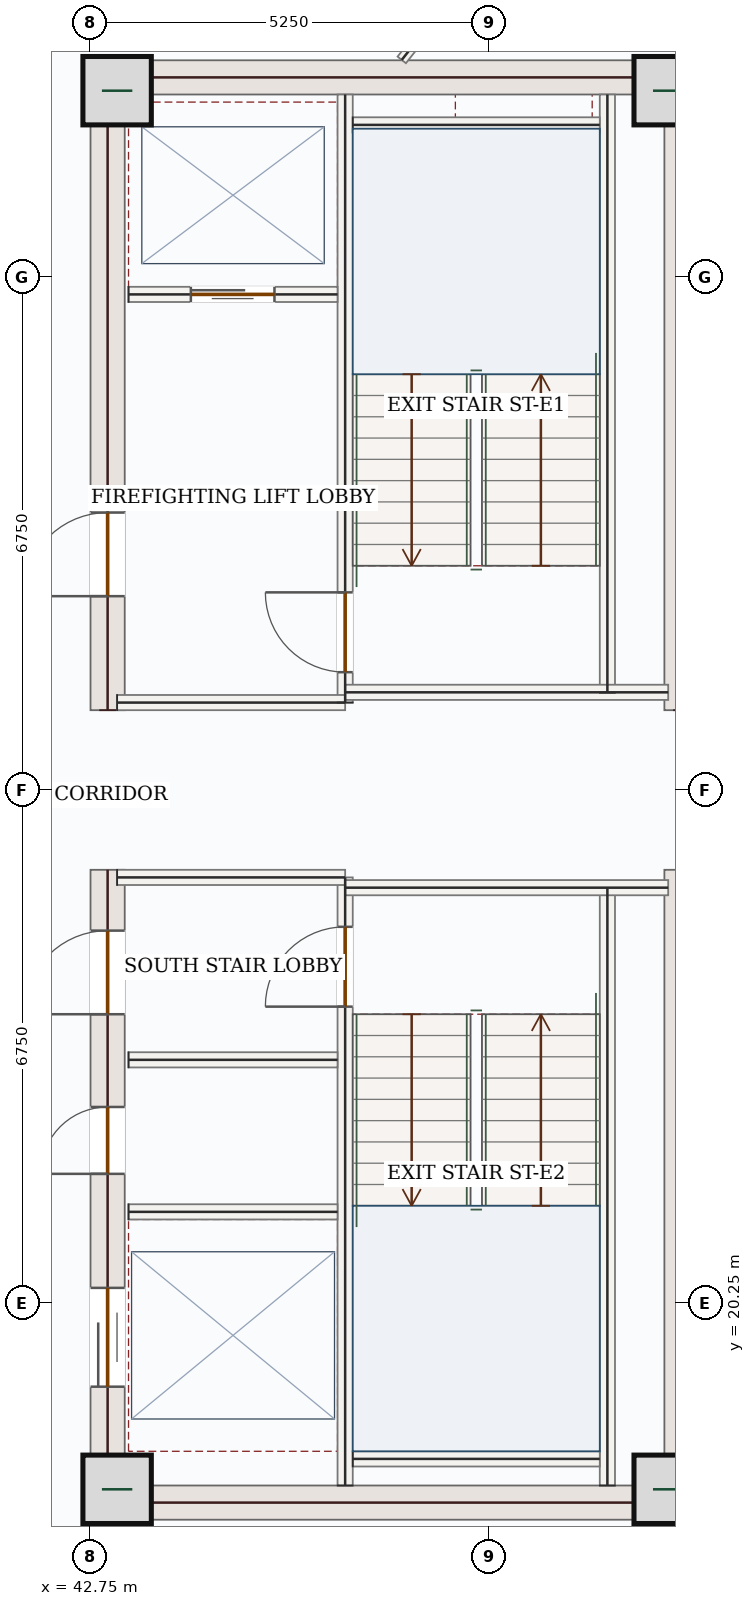
"""IFC4 building model, lengths in metres.
Left out: names, types, materials, properties, quantities, classifications, styles, units other than length and angle.
Written with IfcOpenShell. Run it as: python <this file> out.ifc"""

import sys

from ifc_helpers import new_model, si_unit, direction, frame, frame_2d, origin, origin_2d, place, context, subcontext, project, spatial, rectangle, extrude, source, transform, mapped, element, fill, save


model = new_model("IFC4")
c1 = context("Model", 3, precision=1e-05, world=origin(), true_north=direction((0.0, 1.0)))
c2 = subcontext(c1, "Body", "Model", "MODEL_VIEW")
j1 = project(units=[si_unit("LENGTHUNIT", "METRE"), si_unit("PLANEANGLEUNIT", "RADIAN")], contexts=[c1])
p1 = place(None, origin())
s1 = spatial("IfcSite", under=j1, at=p1, CompositionType="ELEMENT")
p2 = place(p1, origin())
s2 = spatial("IfcBuilding", under=s1, at=p2, CompositionType="ELEMENT")
p3 = place(p2, frame((0.0, 0.0, 319.8)))
s3 = spatial("IfcBuildingStorey", under=s2, at=p3, CompositionType="ELEMENT", Elevation=319.8)
p4 = place(p3, frame((42.975, 17.4, 0.0), z_axis=(0.0, 0.0, 1.0), x_axis=(0.0, 1.0, 0.0)))
e1 = element("IfcWall", 1, at=p4, inside=s3, PredefinedType="SHEAR", context=c2, shape_type="SweptSolid", body=[
    extrude(rectangle(XDim=8.55, YDim=0.45, at=frame_2d((4.275, 0.0))), origin(), (0.0, 0.0, 1.0), 3.5),
])
p5 = place(p4, frame((6.65, 0.0, 0.0)))
e2 = element("IfcOpeningElement", 2, at=p5, cuts=e1, PredefinedType="OPENING", context=c2, shape_type="SweptSolid", body=[
    extrude(rectangle(XDim=1.1, YDim=2.2, at=frame_2d((0.55, 1.1))), frame((0.0, 0.235, 0.0), z_axis=(0.0, -1.0, 0.0), x_axis=(1.0, 0.0, 0.0)), (0.0, 0.0, 1.0), 0.47),
])
p6 = place(p4, frame((1.75, 0.0, 0.0)))
e3 = element("IfcOpeningElement", 3, at=p6, cuts=e1, PredefinedType="OPENING", context=c2, shape_type="SweptSolid", body=[
    extrude(rectangle(XDim=1.3, YDim=2.2, at=frame_2d((0.65, 1.1))), frame((0.0, 0.235, 0.0), z_axis=(0.0, -1.0, 0.0), x_axis=(1.0, 0.0, 0.0)), (0.0, 0.0, 1.0), 0.47),
])
p7 = place(p4, frame((4.55, 0.0, 0.0)))
e4 = element("IfcOpeningElement", 4, at=p7, cuts=e1, PredefinedType="OPENING", context=c2, shape_type="SweptSolid", body=[
    extrude(rectangle(XDim=0.88, YDim=2.1, at=frame_2d((0.44, 1.05))), frame((0.0, 0.235, 0.0), z_axis=(0.0, -1.0, 0.0), x_axis=(1.0, 0.0, 0.0)), (0.0, 0.0, 1.0), 0.47),
])
p8 = place(p3, frame((42.975, 28.05, 0.0), z_axis=(0.0, 0.0, 1.0), x_axis=(0.0, 1.0, 0.0)))
e5 = element("IfcWall", 5, at=p8, inside=s3, PredefinedType="SHEAR", context=c2, shape_type="SweptSolid", body=[
    extrude(rectangle(XDim=8.55, YDim=0.45, at=frame_2d((4.275, 0.0))), origin(), (0.0, 0.0, 1.0), 3.5),
])
p9 = place(p8, frame((1.5, 0.0, 0.0)))
e6 = element("IfcOpeningElement", 6, at=p9, cuts=e5, PredefinedType="OPENING", context=c2, shape_type="SweptSolid", body=[
    extrude(rectangle(XDim=1.1, YDim=2.2, at=frame_2d((0.55, 1.1))), frame((0.0, 0.235, 0.0), z_axis=(0.0, -1.0, 0.0), x_axis=(1.0, 0.0, 0.0)), (0.0, 0.0, 1.0), 0.47),
])
m1 = source(origin(), c2, "Body", "SweptSolid", [
    extrude(rectangle(XDim=8.55, YDim=0.45, at=frame_2d((4.275, 0.0))), origin(), (0.0, 0.0, 1.0), 3.5),
])
for number, where, z_axis, x_axis in (
    (7, (50.525, 17.4, 0.0), (0.0, 0.0, 1.0), (0.0, 1.0, 0.0)),
    (8, (50.525, 28.05, 0.0), (0.0, 0.0, 1.0), (0.0, 1.0, 0.0)),
):
    element("IfcWall", number, at=place(p3, frame(where, z_axis=z_axis, x_axis=x_axis)), inside=s3, PredefinedType="SHEAR", context=c2, shape_type="MappedRepresentation", body=[
        mapped(m1, transform((0.0, 0.0, 0.0), x_axis=(1.0, 0.0, 0.0), y_axis=(0.0, 1.0, 0.0), z_axis=(0.0, 0.0, 1.0), scale=1.0)),
    ])
m2 = source(origin(), c2, "Body", "SweptSolid", [
    extrude(rectangle(XDim=7.1, YDim=0.45, at=frame_2d((3.55, 0.0))), origin(), (0.0, 0.0, 1.0), 3.5),
])
for number, where, z_axis, x_axis in (
    (9, (43.2, 17.625, 0.0), (0.0, 0.0, 1.0), (1.0, 0.0, 0.0)),
    (10, (43.2, 36.375, 0.0), (0.0, 0.0, 1.0), (1.0, 0.0, 0.0)),
):
    element("IfcWall", number, at=place(p3, frame(where, z_axis=z_axis, x_axis=x_axis)), inside=s3, PredefinedType="SHEAR", context=c2, shape_type="MappedRepresentation", body=[
        mapped(m2, transform((0.0, 0.0, 0.0), x_axis=(1.0, 0.0, 0.0), y_axis=(0.0, 1.0, 0.0), z_axis=(0.0, 0.0, 1.0), scale=1.0)),
    ])
m3 = source(origin(), c2, "Body", "SweptSolid", [
    extrude(rectangle(XDim=0.9, YDim=0.9, at=origin_2d()), origin(), (0.0, 0.0, 1.0), 3.75),
])
for number, where, z_axis, x_axis in (
    (11, (43.1, 17.8, 0.0), (0.0, 0.0, 1.0), (1.0, 0.0, 0.0)),
    (12, (50.35, 17.8, 0.0), (0.0, 0.0, 1.0), (1.0, 0.0, 0.0)),
    (13, (43.1, 36.2, 0.0), (0.0, 0.0, 1.0), (1.0, 0.0, 0.0)),
    (14, (50.35, 36.2, 0.0), (0.0, 0.0, 1.0), (1.0, 0.0, 0.0)),
):
    element("IfcColumn", number, at=place(p3, frame(where, z_axis=z_axis, x_axis=x_axis)), inside=s3, PredefinedType="COLUMN", context=c2, shape_type="MappedRepresentation", body=[
        mapped(m3, transform((0.0, 0.0, 0.0), x_axis=(1.0, 0.0, 0.0), y_axis=(0.0, 1.0, 0.0), z_axis=(0.0, 0.0, 1.0), scale=1.0)),
    ])
p10 = place(p3, frame((53.06, 18.458, 0.0), z_axis=(0.0, 0.0, 1.0), x_axis=(-0.707106781187, -0.707106781187, 0.0)))
e15 = element("IfcWall", 15, at=p10, inside=s3, PredefinedType="SOLIDWALL", context=c2, shape_type="SweptSolid", body=[
    extrude(rectangle(XDim=3.963, YDim=0.28, at=frame_2d((1.982, 0.0))), origin(), (0.0, 0.0, 1.0), 3.5),
])
p11 = place(p10, frame((1.232, 0.0, 0.85)))
e16 = element("IfcOpeningElement", 16, at=p11, cuts=e15, PredefinedType="OPENING", context=c2, shape_type="SweptSolid", body=[
    extrude(rectangle(XDim=1.5, YDim=1.5, at=frame_2d((0.75, 0.75))), frame((0.0, 0.15, 0.0), z_axis=(0.0, -1.0, 0.0), x_axis=(1.0, 0.0, 0.0)), (0.0, 0.0, 1.0), 0.3),
])
m4 = source(origin(), c2, "Body", "SweptSolid", [
    extrude(rectangle(XDim=7.87, YDim=0.2, at=frame_2d((3.935, 0.0))), origin(), (0.0, 0.0, 1.0), 3.5),
])
for number, where, z_axis, x_axis in (
    (17, (49.55, 17.85, 0.0), (0.0, 0.0, 1.0), (0.0, 1.0, 0.0)),
    (18, (49.55, 28.28, 0.0), (0.0, 0.0, 1.0), (0.0, 1.0, 0.0)),
):
    element("IfcWall", number, at=place(p3, frame(where, z_axis=z_axis, x_axis=x_axis)), inside=s3, PredefinedType="SOLIDWALL", context=c2, shape_type="MappedRepresentation", body=[
        mapped(m4, transform((0.0, 0.0, 0.0), x_axis=(1.0, 0.0, 0.0), y_axis=(0.0, 1.0, 0.0), z_axis=(0.0, 0.0, 1.0), scale=1.0)),
    ])
p12 = place(p3, frame((46.1, 17.85, 0.0), z_axis=(0.0, 0.0, 1.0), x_axis=(0.0, 1.0, 0.0)))
e19 = element("IfcWall", 19, at=p12, inside=s3, PredefinedType="SOLIDWALL", context=c2, shape_type="SweptSolid", body=[
    extrude(rectangle(XDim=8.0, YDim=0.2, at=frame_2d((4.0, 0.0))), origin(), (0.0, 0.0, 1.0), 3.5),
])
p13 = place(p12, frame((6.3, 0.0, 0.0)))
e20 = element("IfcOpeningElement", 20, at=p13, cuts=e19, PredefinedType="OPENING", context=c2, shape_type="SweptSolid", body=[
    extrude(rectangle(XDim=1.05, YDim=2.15, at=frame_2d((0.525, 1.075))), frame((0.0, 0.11, 0.0), z_axis=(0.0, -1.0, 0.0), x_axis=(1.0, 0.0, 0.0)), (0.0, 0.0, 1.0), 0.22),
])
p14 = place(p3, frame((46.1, 28.15, 0.0), z_axis=(0.0, 0.0, 1.0), x_axis=(0.0, 1.0, 0.0)))
e21 = element("IfcWall", 21, at=p14, inside=s3, PredefinedType="SOLIDWALL", context=c2, shape_type="SweptSolid", body=[
    extrude(rectangle(XDim=8.0, YDim=0.2, at=frame_2d((4.0, 0.0))), origin(), (0.0, 0.0, 1.0), 3.5),
])
p15 = place(p14, frame((0.4, 0.0, 0.0)))
e22 = element("IfcOpeningElement", 22, at=p15, cuts=e21, PredefinedType="OPENING", context=c2, shape_type="SweptSolid", body=[
    extrude(rectangle(XDim=1.05, YDim=2.15, at=frame_2d((0.525, 1.075))), frame((0.0, 0.11, 0.0), z_axis=(0.0, -1.0, 0.0), x_axis=(1.0, 0.0, 0.0)), (0.0, 0.0, 1.0), 0.22),
])
m5 = source(origin(), c2, "Body", "SweptSolid", [
    extrude(rectangle(XDim=3.0, YDim=0.2, at=frame_2d((1.5, 0.0))), origin(), (0.0, 0.0, 1.0), 3.5),
])
p16 = place(p3, frame((43.1, 25.85, 0.0), z_axis=(0.0, 0.0, 1.0), x_axis=(1.0, 0.0, 0.0)))
e23 = element("IfcWall", 23, at=p16, inside=s3, PredefinedType="SOLIDWALL", context=c2, shape_type="MappedRepresentation", body=[
    mapped(m5, transform((0.0, 0.0, 0.0), x_axis=(1.0, 0.0, 0.0), y_axis=(0.0, 1.0, 0.0), z_axis=(0.0, 0.0, 1.0), scale=1.0)),
])
m6 = source(origin(), c2, "Body", "SweptSolid", [
    extrude(rectangle(XDim=4.25, YDim=0.2, at=frame_2d((2.125, 0.0))), origin(), (0.0, 0.0, 1.0), 3.5),
])
p17 = place(p3, frame((46.1, 25.715, 0.0), z_axis=(0.0, 0.0, 1.0), x_axis=(1.0, 0.0, 0.0)))
e24 = element("IfcWall", 24, at=p17, inside=s3, PredefinedType="SOLIDWALL", context=c2, shape_type="MappedRepresentation", body=[
    mapped(m6, transform((0.0, 0.0, 0.0), x_axis=(1.0, 0.0, 0.0), y_axis=(0.0, 1.0, 0.0), z_axis=(0.0, 0.0, 1.0), scale=1.0)),
])
p18 = place(p3, frame((43.1, 28.15, 0.0), z_axis=(0.0, 0.0, 1.0), x_axis=(1.0, 0.0, 0.0)))
e25 = element("IfcWall", 25, at=p18, inside=s3, PredefinedType="SOLIDWALL", context=c2, shape_type="MappedRepresentation", body=[
    mapped(m5, transform((0.0, 0.0, 0.0), x_axis=(1.0, 0.0, 0.0), y_axis=(0.0, 1.0, 0.0), z_axis=(0.0, 0.0, 1.0), scale=1.0)),
])
p19 = place(p3, frame((46.1, 28.285, 0.0), z_axis=(0.0, 0.0, 1.0), x_axis=(1.0, 0.0, 0.0)))
e26 = element("IfcWall", 26, at=p19, inside=s3, PredefinedType="SOLIDWALL", context=c2, shape_type="MappedRepresentation", body=[
    mapped(m6, transform((0.0, 0.0, 0.0), x_axis=(1.0, 0.0, 0.0), y_axis=(0.0, 1.0, 0.0), z_axis=(0.0, 0.0, 1.0), scale=1.0)),
])
m7 = source(origin(), c2, "Body", "SweptSolid", [
    extrude(rectangle(XDim=3.25, YDim=0.2, at=frame_2d((1.625, 0.0))), origin(), (0.0, 0.0, 1.0), 3.5),
])
for number, where, z_axis, x_axis in (
    (27, (46.2, 35.75, 0.0), (0.0, 0.0, 1.0), (1.0, 0.0, 0.0)),
    (28, (46.2, 18.2, 0.0), (0.0, 0.0, 1.0), (1.0, 0.0, 0.0)),
):
    element("IfcWall", number, at=place(p3, frame(where, z_axis=z_axis, x_axis=x_axis)), inside=s3, PredefinedType="SOLIDWALL", context=c2, shape_type="MappedRepresentation", body=[
        mapped(m7, transform((0.0, 0.0, 0.0), x_axis=(1.0, 0.0, 0.0), y_axis=(0.0, 1.0, 0.0), z_axis=(0.0, 0.0, 1.0), scale=1.0)),
    ])
p20 = place(p3, frame((43.25, 33.52, 0.0), z_axis=(0.0, 0.0, 1.0), x_axis=(1.0, 0.0, 0.0)))
e29 = element("IfcWall", 29, at=p20, inside=s3, PredefinedType="SOLIDWALL", context=c2, shape_type="SweptSolid", body=[
    extrude(rectangle(XDim=2.75, YDim=0.2, at=frame_2d((1.375, 0.0))), origin(), (0.0, 0.0, 1.0), 3.5),
])
p21 = place(p20, frame((0.82, 0.0, 0.0)))
e30 = element("IfcOpeningElement", 30, at=p21, cuts=e29, PredefinedType="OPENING", context=c2, shape_type="SweptSolid", body=[
    extrude(rectangle(XDim=1.1, YDim=2.15, at=frame_2d((0.55, 1.075))), frame((0.0, 0.11, 0.0), z_axis=(0.0, -1.0, 0.0), x_axis=(1.0, 0.0, 0.0)), (0.0, 0.0, 1.0), 0.22),
])
m8 = source(origin(), c2, "Body", "SweptSolid", [
    extrude(rectangle(XDim=2.75, YDim=0.2, at=frame_2d((1.375, 0.0))), origin(), (0.0, 0.0, 1.0), 3.5),
])
for number, where, z_axis, x_axis in (
    (31, (43.25, 23.45, 0.0), (0.0, 0.0, 1.0), (1.0, 0.0, 0.0)),
    (32, (43.25, 21.45, 0.0), (0.0, 0.0, 1.0), (1.0, 0.0, 0.0)),
):
    element("IfcWall", number, at=place(p3, frame(where, z_axis=z_axis, x_axis=x_axis)), inside=s3, PredefinedType="SOLIDWALL", context=c2, shape_type="MappedRepresentation", body=[
        mapped(m8, transform((0.0, 0.0, 0.0), x_axis=(1.0, 0.0, 0.0), y_axis=(0.0, 1.0, 0.0), z_axis=(0.0, 0.0, 1.0), scale=1.0)),
    ])
m9 = source(origin(), c2, "Body", "SweptSolid", [
    extrude(rectangle(XDim=3.818, YDim=0.14, at=frame_2d((1.909, 0.0))), origin(), (0.0, 0.0, 1.0), 3.5),
])
p22 = place(p3, frame((49.208, 39.604, 0.0), z_axis=(0.0, 0.0, 1.0), x_axis=(-0.619119655452, -0.78529666511, 0.0)))
e33 = element("IfcWall", 33, at=p22, inside=s3, PredefinedType="PARTITIONING", context=c2, shape_type="MappedRepresentation", body=[
    mapped(m9, transform((0.0, 0.0, 0.0), x_axis=(1.0, 0.0, 0.0), y_axis=(0.0, 1.0, 0.0), z_axis=(0.0, 0.0, 1.0), scale=1.0)),
])
m10 = source(origin(), c2, "Body", "SweptSolid", [
    extrude(rectangle(XDim=1.05, YDim=2.15, at=frame_2d((0.525, 1.075))), frame((0.0, 0.025, 0.0), z_axis=(0.0, -1.0, 0.0), x_axis=(1.0, 0.0, 0.0)), (0.0, 0.0, 1.0), 0.05),
])
p23 = place(p15, origin())
e34 = element("IfcDoor", 34, at=p23, inside=s3, OperationType="SINGLE_SWING_RIGHT", PredefinedType="DOOR", context=c2, shape_type="MappedRepresentation", body=[
    mapped(m10, transform((0.0, 0.0, 0.0), x_axis=(1.0, 0.0, 0.0), y_axis=(0.0, 1.0, 0.0), z_axis=(0.0, 0.0, 1.0), scale=1.0)),
])
fill(e22, e34)
p24 = place(p13, origin())
e35 = element("IfcDoor", 35, at=p24, inside=s3, OperationType="SINGLE_SWING_LEFT", PredefinedType="DOOR", context=c2, shape_type="MappedRepresentation", body=[
    mapped(m10, transform((0.0, 0.0, 0.0), x_axis=(1.0, 0.0, 0.0), y_axis=(0.0, 1.0, 0.0), z_axis=(0.0, 0.0, 1.0), scale=1.0)),
])
fill(e20, e35)
m11 = source(origin(), c2, "Body", "SweptSolid", [
    extrude(rectangle(XDim=1.1, YDim=2.15, at=frame_2d((0.55, 1.075))), frame((0.0, 0.025, 0.0), z_axis=(0.0, -1.0, 0.0), x_axis=(1.0, 0.0, 0.0)), (0.0, 0.0, 1.0), 0.05),
])
p25 = place(p21, origin())
e36 = element("IfcDoor", 36, at=p25, inside=s3, OperationType="DOUBLE_DOOR_SLIDING", PredefinedType="DOOR", context=c2, shape_type="MappedRepresentation", body=[
    mapped(m11, transform((0.0, 0.0, 0.0), x_axis=(1.0, 0.0, 0.0), y_axis=(0.0, 1.0, 0.0), z_axis=(0.0, 0.0, 1.0), scale=1.0)),
])
fill(e30, e36)
m12 = source(origin(), c2, "Body", "SweptSolid", [
    extrude(rectangle(XDim=1.1, YDim=2.2, at=frame_2d((0.55, 1.1))), frame((0.0, 0.025, 0.0), z_axis=(0.0, -1.0, 0.0), x_axis=(1.0, 0.0, 0.0)), (0.0, 0.0, 1.0), 0.05),
])
p26 = place(p9, origin())
e37 = element("IfcDoor", 37, at=p26, inside=s3, OperationType="SINGLE_SWING_LEFT", PredefinedType="DOOR", context=c2, shape_type="MappedRepresentation", body=[
    mapped(m12, transform((0.0, 0.0, 0.0), x_axis=(1.0, 0.0, 0.0), y_axis=(0.0, 1.0, 0.0), z_axis=(0.0, 0.0, 1.0), scale=1.0)),
])
fill(e6, e37)
p27 = place(p5, origin())
e38 = element("IfcDoor", 38, at=p27, inside=s3, OperationType="SINGLE_SWING_LEFT", PredefinedType="DOOR", context=c2, shape_type="MappedRepresentation", body=[
    mapped(m12, transform((0.0, 0.0, 0.0), x_axis=(1.0, 0.0, 0.0), y_axis=(0.0, 1.0, 0.0), z_axis=(0.0, 0.0, 1.0), scale=1.0)),
])
fill(e2, e38)
m13 = source(origin(), c2, "Body", "SweptSolid", [
    extrude(rectangle(XDim=1.3, YDim=2.2, at=frame_2d((0.65, 1.1))), frame((0.0, 0.025, 0.0), z_axis=(0.0, -1.0, 0.0), x_axis=(1.0, 0.0, 0.0)), (0.0, 0.0, 1.0), 0.05),
])
p28 = place(p6, origin())
e39 = element("IfcDoor", 39, at=p28, inside=s3, OperationType="DOUBLE_DOOR_SLIDING", PredefinedType="DOOR", context=c2, shape_type="MappedRepresentation", body=[
    mapped(m13, transform((0.0, 0.0, 0.0), x_axis=(1.0, 0.0, 0.0), y_axis=(0.0, 1.0, 0.0), z_axis=(0.0, 0.0, 1.0), scale=1.0)),
])
fill(e3, e39)
m14 = source(origin(), c2, "Body", "SweptSolid", [
    extrude(rectangle(XDim=0.88, YDim=2.1, at=frame_2d((0.44, 1.05))), frame((0.0, 0.025, 0.0), z_axis=(0.0, -1.0, 0.0), x_axis=(1.0, 0.0, 0.0)), (0.0, 0.0, 1.0), 0.05),
])
p29 = place(p7, origin())
e40 = element("IfcDoor", 40, at=p29, inside=s3, OperationType="SINGLE_SWING_LEFT", PredefinedType="DOOR", context=c2, shape_type="MappedRepresentation", body=[
    mapped(m14, transform((0.0, 0.0, 0.0), x_axis=(1.0, 0.0, 0.0), y_axis=(0.0, 1.0, 0.0), z_axis=(0.0, 0.0, 1.0), scale=1.0)),
])
fill(e4, e40)
save(model, sys.argv[1])
